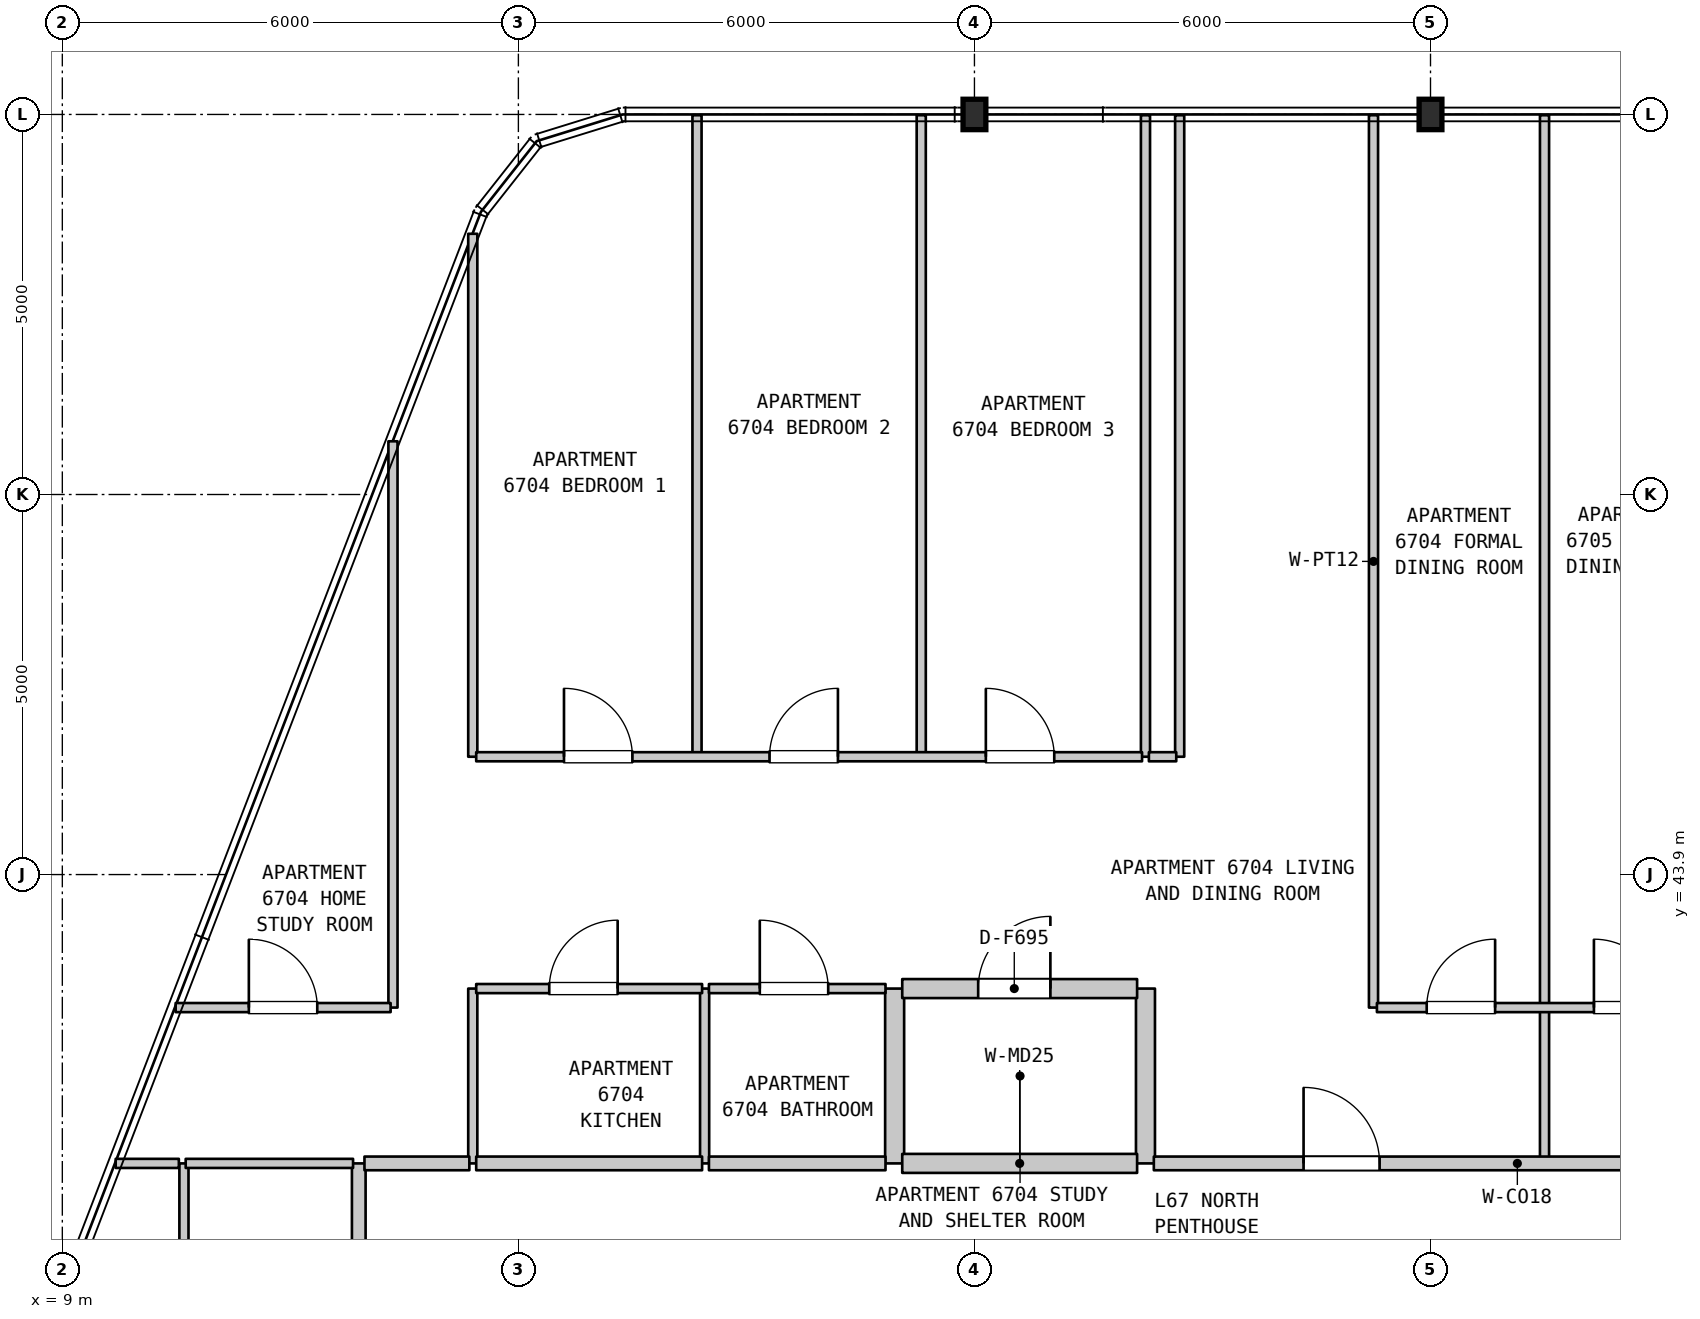
"""IFC4 building model, lengths in metres.
Left out: names, types, materials, properties, quantities, classifications, styles, units other than length and angle.
Written with IfcOpenShell. Run it as: python <this file> out.ifc"""

import sys

from ifc_helpers import new_model, si_unit, direction, frame, frame_2d, origin, origin_2d, place, context, subcontext, project, spatial, rectangle, i_section, extrude, element, fill, save


model = new_model("IFC4")
c1 = context("Model", 3, precision=1e-05, world=origin(), true_north=direction((0.0, 1.0)))
c2 = subcontext(c1, "Body", "Model", "MODEL_VIEW")
j1 = project(units=[si_unit("LENGTHUNIT", "METRE"), si_unit("PLANEANGLEUNIT", "RADIAN")], contexts=[c1])
p1 = place(None, origin())
s1 = spatial("IfcSite", under=j1, at=p1, CompositionType="ELEMENT")
p2 = place(p1, origin())
s2 = spatial("IfcBuilding", under=s1, at=p2, CompositionType="ELEMENT")
p3 = place(p2, frame((0.0, 0.0, 269.5)))
s3 = spatial("IfcBuildingStorey", under=s2, at=p3, CompositionType="ELEMENT", Elevation=269.5)
for number, where, z_axis, x_axis in (
    (1, (21.0, 53.9, 0.0), (0.0, 0.0, 1.0), (1.0, 0.0, 0.0)),
    (2, (27.0, 53.9, 0.0), (0.0, 0.0, 1.0), (1.0, 0.0, 0.0)),
):
    element("IfcColumn", number, at=place(p3, frame(where, z_axis=z_axis, x_axis=x_axis)), inside=s3, PredefinedType="COLUMN", context=c2, shape_type="SweptSolid", body=[
        extrude(i_section(OverallWidth=0.3, OverallDepth=0.4, WebThickness=0.013, FlangeThickness=0.024, FilletRadius=0.027, at=origin_2d()), origin(), (0.0, 0.0, 1.0), 3.7),
    ])
p4 = place(p3, frame((10.6, 33.32, 0.0), z_axis=(0.0, 0.0, 1.0), x_axis=(0.0, 1.0, 0.0)))
e3 = element("IfcWall", 3, at=p4, inside=s3, PredefinedType="PARTITIONING", context=c2, shape_type="SweptSolid", body=[
    extrude(rectangle(XDim=6.78, YDim=0.12, at=frame_2d((3.39, 0.0))), origin(), (0.0, 0.0, 1.0), 3.39),
])
p5 = place(p3, frame((12.9, 33.32, 0.0), z_axis=(0.0, 0.0, 1.0), x_axis=(0.0, 1.0, 0.0)))
e4 = element("IfcWall", 4, at=p5, inside=s3, PredefinedType="STANDARD", context=c2, shape_type="SweptSolid", body=[
    extrude(rectangle(XDim=6.78, YDim=0.18, at=frame_2d((3.39, 0.0))), origin(), (0.0, 0.0, 1.0), 3.39),
])
p6 = place(p3, frame((13.35, 42.15, 0.0), z_axis=(0.0, 0.0, 1.0), x_axis=(0.0, 1.0, 0.0)))
e5 = element("IfcWall", 5, at=p6, inside=s3, PredefinedType="PARTITIONING", context=c2, shape_type="SweptSolid", body=[
    extrude(rectangle(XDim=7.45, YDim=0.12, at=frame_2d((3.725, 0.0))), origin(), (0.0, 0.0, 1.0), 3.39),
])
p7 = place(p3, frame((14.4, 40.1, 0.0), z_axis=(0.0, 0.0, 1.0), x_axis=(0.0, 1.0, 0.0)))
e6 = element("IfcWall", 6, at=p7, inside=s3, PredefinedType="PARTITIONING", context=c2, shape_type="SweptSolid", body=[
    extrude(rectangle(XDim=2.3, YDim=0.12, at=frame_2d((1.15, 0.0))), origin(), (0.0, 0.0, 1.0), 3.39),
])
p8 = place(p3, frame((14.4, 45.45, 0.0), z_axis=(0.0, 0.0, 1.0), x_axis=(0.0, 1.0, 0.0)))
e7 = element("IfcWall", 7, at=p8, inside=s3, PredefinedType="PARTITIONING", context=c2, shape_type="SweptSolid", body=[
    extrude(rectangle(XDim=6.88, YDim=0.12, at=frame_2d((3.44, 0.0))), origin(), (0.0, 0.0, 1.0), 3.39),
])
p9 = place(p3, frame((17.35, 45.45, 0.0), z_axis=(0.0, 0.0, 1.0), x_axis=(0.0, 1.0, 0.0)))
e8 = element("IfcWall", 8, at=p9, inside=s3, PredefinedType="PARTITIONING", context=c2, shape_type="SweptSolid", body=[
    extrude(rectangle(XDim=8.44, YDim=0.12, at=frame_2d((4.22, 0.0))), origin(), (0.0, 0.0, 1.0), 3.39),
])
p10 = place(p3, frame((17.45, 40.1, 0.0), z_axis=(0.0, 0.0, 1.0), x_axis=(0.0, 1.0, 0.0)))
e9 = element("IfcWall", 9, at=p10, inside=s3, PredefinedType="PARTITIONING", context=c2, shape_type="SweptSolid", body=[
    extrude(rectangle(XDim=2.3, YDim=0.12, at=frame_2d((1.15, 0.0))), origin(), (0.0, 0.0, 1.0), 3.39),
])
p11 = place(p3, frame((19.95, 40.1, 0.0), z_axis=(0.0, 0.0, 1.0), x_axis=(0.0, 1.0, 0.0)))
e10 = element("IfcWall", 10, at=p11, inside=s3, PredefinedType="STANDARD", context=c2, shape_type="SweptSolid", body=[
    extrude(rectangle(XDim=2.3, YDim=0.25, at=frame_2d((1.15, 0.0))), origin(), (0.0, 0.0, 1.0), 3.39),
])
p12 = place(p3, frame((20.3, 45.45, 0.0), z_axis=(0.0, 0.0, 1.0), x_axis=(0.0, 1.0, 0.0)))
e11 = element("IfcWall", 11, at=p12, inside=s3, PredefinedType="PARTITIONING", context=c2, shape_type="SweptSolid", body=[
    extrude(rectangle(XDim=8.44, YDim=0.12, at=frame_2d((4.22, 0.0))), origin(), (0.0, 0.0, 1.0), 3.39),
])
p13 = place(p3, frame((23.25, 40.1, 0.0), z_axis=(0.0, 0.0, 1.0), x_axis=(0.0, 1.0, 0.0)))
e12 = element("IfcWall", 12, at=p13, inside=s3, PredefinedType="STANDARD", context=c2, shape_type="SweptSolid", body=[
    extrude(rectangle(XDim=2.3, YDim=0.25, at=frame_2d((1.15, 0.0))), origin(), (0.0, 0.0, 1.0), 3.39),
])
for number, where, z_axis, x_axis in (
    (13, (23.25, 45.45, 0.0), (0.0, 0.0, 1.0), (0.0, 1.0, 0.0)),
    (14, (23.7, 45.45, 0.0), (0.0, 0.0, 1.0), (0.0, 1.0, 0.0)),
):
    element("IfcWall", number, at=place(p3, frame(where, z_axis=z_axis, x_axis=x_axis)), inside=s3, PredefinedType="PARTITIONING", context=c2, shape_type="SweptSolid", body=[
        extrude(rectangle(XDim=8.44, YDim=0.12, at=frame_2d((4.22, 0.0))), origin(), (0.0, 0.0, 1.0), 3.39),
    ])
p14 = place(p3, frame((26.25, 42.15, 0.0), z_axis=(0.0, 0.0, 1.0), x_axis=(0.0, 1.0, 0.0)))
e15 = element("IfcWall", 15, at=p14, inside=s3, PredefinedType="PARTITIONING", context=c2, shape_type="SweptSolid", body=[
    extrude(rectangle(XDim=11.74, YDim=0.12, at=frame_2d((5.87, 0.0))), origin(), (0.0, 0.0, 1.0), 3.39),
])
p15 = place(p3, frame((28.5, 40.1, 0.0), z_axis=(0.0, 0.0, 1.0), x_axis=(0.0, 1.0, 0.0)))
e16 = element("IfcWall", 16, at=p15, inside=s3, PredefinedType="PARTITIONING", context=c2, shape_type="SweptSolid", body=[
    extrude(rectangle(XDim=2.05, YDim=0.12, at=frame_2d((1.025, 0.0))), origin(), (0.0, 0.0, 1.0), 3.39),
])
p16 = place(p3, frame((28.5, 42.15, 0.0), z_axis=(0.0, 0.0, 1.0), x_axis=(0.0, 1.0, 0.0)))
e17 = element("IfcWall", 17, at=p16, inside=s3, PredefinedType="PARTITIONING", context=c2, shape_type="SweptSolid", body=[
    extrude(rectangle(XDim=11.74, YDim=0.12, at=frame_2d((5.87, 0.0))), origin(), (0.0, 0.0, 1.0), 3.39),
])
p17 = place(p3, frame((9.702, 40.1, 0.0), z_axis=(0.0, 0.0, 1.0), x_axis=(1.0, 0.0, 0.0)))
e18 = element("IfcWall", 18, at=p17, inside=s3, PredefinedType="PARTITIONING", context=c2, shape_type="SweptSolid", body=[
    extrude(rectangle(XDim=0.831, YDim=0.12, at=frame_2d((0.416, 0.0))), origin(), (0.0, 0.0, 1.0), 3.39),
])
p18 = place(p3, frame((10.623, 40.1, 0.0), z_axis=(0.0, 0.0, 1.0), x_axis=(1.0, 0.0, 0.0)))
e19 = element("IfcWall", 19, at=p18, inside=s3, PredefinedType="PARTITIONING", context=c2, shape_type="SweptSolid", body=[
    extrude(rectangle(XDim=2.202, YDim=0.12, at=frame_2d((1.101, 0.0))), origin(), (0.0, 0.0, 1.0), 3.39),
])
p19 = place(p3, frame((12.975, 40.1, 0.0), z_axis=(0.0, 0.0, 1.0), x_axis=(1.0, 0.0, 0.0)))
e20 = element("IfcWall", 20, at=p19, inside=s3, PredefinedType="STANDARD", context=c2, shape_type="SweptSolid", body=[
    extrude(rectangle(XDim=1.38, YDim=0.18, at=frame_2d((0.69, 0.0))), origin(), (0.0, 0.0, 1.0), 3.39),
])
p20 = place(p3, frame((14.445, 40.1, 0.0), z_axis=(0.0, 0.0, 1.0), x_axis=(1.0, 0.0, 0.0)))
e21 = element("IfcWall", 21, at=p20, inside=s3, PredefinedType="STANDARD", context=c2, shape_type="SweptSolid", body=[
    extrude(rectangle(XDim=2.972, YDim=0.18, at=frame_2d((1.486, 0.0))), origin(), (0.0, 0.0, 1.0), 3.39),
])
p21 = place(p3, frame((17.507, 40.1, 0.0), z_axis=(0.0, 0.0, 1.0), x_axis=(1.0, 0.0, 0.0)))
e22 = element("IfcWall", 22, at=p21, inside=s3, PredefinedType="STANDARD", context=c2, shape_type="SweptSolid", body=[
    extrude(rectangle(XDim=2.323, YDim=0.18, at=frame_2d((1.162, 0.0))), origin(), (0.0, 0.0, 1.0), 3.39),
])
p22 = place(p3, frame((20.05, 40.1, 0.0), z_axis=(0.0, 0.0, 1.0), x_axis=(1.0, 0.0, 0.0)))
e23 = element("IfcWall", 23, at=p22, inside=s3, PredefinedType="STANDARD", context=c2, shape_type="SweptSolid", body=[
    extrude(rectangle(XDim=3.09, YDim=0.25, at=frame_2d((1.545, 0.0))), origin(), (0.0, 0.0, 1.0), 3.39),
])
p23 = place(p3, frame((23.36, 40.1, 0.0), z_axis=(0.0, 0.0, 1.0), x_axis=(1.0, 0.0, 0.0)))
e24 = element("IfcWall", 24, at=p23, inside=s3, PredefinedType="STANDARD", context=c2, shape_type="SweptSolid", body=[
    extrude(rectangle(XDim=9.565, YDim=0.18, at=frame_2d((4.782, 0.0))), origin(), (0.0, 0.0, 1.0), 3.39),
])
p24 = place(p23, frame((1.97, 0.0, 0.0)))
e25 = element("IfcOpeningElement", 25, at=p24, cuts=e24, PredefinedType="OPENING", context=c2, shape_type="SweptSolid", body=[
    extrude(rectangle(XDim=1.0, YDim=2.15, at=frame_2d((0.5, 1.075))), frame((0.0, 0.1, 0.0), z_axis=(0.0, -1.0, 0.0), x_axis=(1.0, 0.0, 0.0)), (0.0, 0.0, 1.0), 0.2),
])
p25 = place(p23, frame((6.793, 0.0, 0.0)))
e26 = element("IfcOpeningElement", 26, at=p25, cuts=e24, PredefinedType="OPENING", context=c2, shape_type="SweptSolid", body=[
    extrude(rectangle(XDim=1.0, YDim=2.15, at=frame_2d((0.5, 1.075))), frame((0.0, 0.1, 0.0), z_axis=(0.0, -1.0, 0.0), x_axis=(1.0, 0.0, 0.0)), (0.0, 0.0, 1.0), 0.2),
])
p26 = place(p3, frame((10.491, 42.15, 0.0), z_axis=(0.0, 0.0, 1.0), x_axis=(1.0, 0.0, 0.0)))
e27 = element("IfcWall", 27, at=p26, inside=s3, PredefinedType="PARTITIONING", context=c2, shape_type="SweptSolid", body=[
    extrude(rectangle(XDim=2.828, YDim=0.12, at=frame_2d((1.414, 0.0))), origin(), (0.0, 0.0, 1.0), 3.39),
])
p27 = place(p26, frame((0.963, 0.0, 0.0)))
e28 = element("IfcOpeningElement", 28, at=p27, cuts=e27, PredefinedType="OPENING", context=c2, shape_type="SweptSolid", body=[
    extrude(rectangle(XDim=0.9, YDim=2.15, at=frame_2d((0.45, 1.075))), frame((0.0, 0.07, 0.0), z_axis=(0.0, -1.0, 0.0), x_axis=(1.0, 0.0, 0.0)), (0.0, 0.0, 1.0), 0.14),
])
p28 = place(p3, frame((26.295, 42.15, 0.0), z_axis=(0.0, 0.0, 1.0), x_axis=(1.0, 0.0, 0.0)))
e29 = element("IfcWall", 29, at=p28, inside=s3, PredefinedType="PARTITIONING", context=c2, shape_type="SweptSolid", body=[
    extrude(rectangle(XDim=4.41, YDim=0.12, at=frame_2d((2.205, 0.0))), origin(), (0.0, 0.0, 1.0), 3.39),
])
p29 = place(p28, frame((0.655, 0.0, 0.0)))
e30 = element("IfcOpeningElement", 30, at=p29, cuts=e29, PredefinedType="OPENING", context=c2, shape_type="SweptSolid", body=[
    extrude(rectangle(XDim=0.9, YDim=2.15, at=frame_2d((0.45, 1.075))), frame((0.0, 0.07, 0.0), z_axis=(0.0, -1.0, 0.0), x_axis=(1.0, 0.0, 0.0)), (0.0, 0.0, 1.0), 0.14),
])
p30 = place(p28, frame((2.855, 0.0, 0.0)))
e31 = element("IfcOpeningElement", 31, at=p30, cuts=e29, PredefinedType="OPENING", context=c2, shape_type="SweptSolid", body=[
    extrude(rectangle(XDim=0.9, YDim=2.15, at=frame_2d((0.45, 1.075))), frame((0.0, 0.07, 0.0), z_axis=(0.0, -1.0, 0.0), x_axis=(1.0, 0.0, 0.0)), (0.0, 0.0, 1.0), 0.14),
])
p31 = place(p3, frame((14.445, 42.4, 0.0), z_axis=(0.0, 0.0, 1.0), x_axis=(1.0, 0.0, 0.0)))
e32 = element("IfcWall", 32, at=p31, inside=s3, PredefinedType="PARTITIONING", context=c2, shape_type="SweptSolid", body=[
    extrude(rectangle(XDim=2.972, YDim=0.12, at=frame_2d((1.486, 0.0))), origin(), (0.0, 0.0, 1.0), 3.39),
])
p32 = place(p31, frame((0.961, 0.0, 0.0)))
e33 = element("IfcOpeningElement", 33, at=p32, cuts=e32, PredefinedType="OPENING", context=c2, shape_type="SweptSolid", body=[
    extrude(rectangle(XDim=0.9, YDim=2.15, at=frame_2d((0.45, 1.075))), frame((0.0, 0.07, 0.0), z_axis=(0.0, -1.0, 0.0), x_axis=(1.0, 0.0, 0.0)), (0.0, 0.0, 1.0), 0.14),
])
p33 = place(p3, frame((17.507, 42.4, 0.0), z_axis=(0.0, 0.0, 1.0), x_axis=(1.0, 0.0, 0.0)))
e34 = element("IfcWall", 34, at=p33, inside=s3, PredefinedType="PARTITIONING", context=c2, shape_type="SweptSolid", body=[
    extrude(rectangle(XDim=2.323, YDim=0.12, at=frame_2d((1.162, 0.0))), origin(), (0.0, 0.0, 1.0), 3.39),
])
p34 = place(p33, frame((0.669, 0.0, 0.0)))
e35 = element("IfcOpeningElement", 35, at=p34, cuts=e34, PredefinedType="OPENING", context=c2, shape_type="SweptSolid", body=[
    extrude(rectangle(XDim=0.9, YDim=2.1, at=frame_2d((0.45, 1.05))), frame((0.0, 0.07, 0.0), z_axis=(0.0, -1.0, 0.0), x_axis=(1.0, 0.0, 0.0)), (0.0, 0.0, 1.0), 0.14),
])
p35 = place(p3, frame((20.05, 42.4, 0.0), z_axis=(0.0, 0.0, 1.0), x_axis=(1.0, 0.0, 0.0)))
e36 = element("IfcWall", 36, at=p35, inside=s3, PredefinedType="STANDARD", context=c2, shape_type="SweptSolid", body=[
    extrude(rectangle(XDim=3.09, YDim=0.25, at=frame_2d((1.545, 0.0))), origin(), (0.0, 0.0, 1.0), 3.39),
])
p36 = place(p35, frame((0.999, 0.0, 0.0)))
e37 = element("IfcOpeningElement", 37, at=p36, cuts=e36, PredefinedType="OPENING", context=c2, shape_type="SweptSolid", body=[
    extrude(rectangle(XDim=0.95, YDim=2.15, at=frame_2d((0.475, 1.075))), frame((0.0, 0.135, 0.0), z_axis=(0.0, -1.0, 0.0), x_axis=(1.0, 0.0, 0.0)), (0.0, 0.0, 1.0), 0.27),
])
p37 = place(p3, frame((14.445, 45.45, 0.0), z_axis=(0.0, 0.0, 1.0), x_axis=(1.0, 0.0, 0.0)))
e38 = element("IfcWall", 38, at=p37, inside=s3, PredefinedType="PARTITIONING", context=c2, shape_type="SweptSolid", body=[
    extrude(rectangle(XDim=8.76, YDim=0.12, at=frame_2d((4.38, 0.0))), origin(), (0.0, 0.0, 1.0), 3.39),
])
p38 = place(p37, frame((1.155, 0.0, 0.0)))
e39 = element("IfcOpeningElement", 39, at=p38, cuts=e38, PredefinedType="OPENING", context=c2, shape_type="SweptSolid", body=[
    extrude(rectangle(XDim=0.9, YDim=2.15, at=frame_2d((0.45, 1.075))), frame((0.0, 0.07, 0.0), z_axis=(0.0, -1.0, 0.0), x_axis=(1.0, 0.0, 0.0)), (0.0, 0.0, 1.0), 0.14),
])
p39 = place(p37, frame((3.859, 0.0, 0.0)))
e40 = element("IfcOpeningElement", 40, at=p39, cuts=e38, PredefinedType="OPENING", context=c2, shape_type="SweptSolid", body=[
    extrude(rectangle(XDim=0.9, YDim=2.15, at=frame_2d((0.45, 1.075))), frame((0.0, 0.07, 0.0), z_axis=(0.0, -1.0, 0.0), x_axis=(1.0, 0.0, 0.0)), (0.0, 0.0, 1.0), 0.14),
])
p40 = place(p37, frame((6.705, 0.0, 0.0)))
e41 = element("IfcOpeningElement", 41, at=p40, cuts=e38, PredefinedType="OPENING", context=c2, shape_type="SweptSolid", body=[
    extrude(rectangle(XDim=0.9, YDim=2.15, at=frame_2d((0.45, 1.075))), frame((0.0, 0.07, 0.0), z_axis=(0.0, -1.0, 0.0), x_axis=(1.0, 0.0, 0.0)), (0.0, 0.0, 1.0), 0.14),
])
p41 = place(p3, frame((23.295, 45.45, 0.0), z_axis=(0.0, 0.0, 1.0), x_axis=(1.0, 0.0, 0.0)))
e42 = element("IfcWall", 42, at=p41, inside=s3, PredefinedType="PARTITIONING", context=c2, shape_type="SweptSolid", body=[
    extrude(rectangle(XDim=0.36, YDim=0.12, at=frame_2d((0.18, 0.0))), origin(), (0.0, 0.0, 1.0), 3.39),
])
p42 = place(p24, origin())
e43 = element("IfcDoor", 43, at=p42, inside=s3, OperationType="SINGLE_SWING_LEFT", PredefinedType="DOOR", context=c2, shape_type="SweptSolid", body=[
    extrude(rectangle(XDim=1.0, YDim=2.15, at=frame_2d((0.5, 1.075))), frame((0.0, 0.025, 0.0), z_axis=(0.0, -1.0, 0.0), x_axis=(1.0, 0.0, 0.0)), (0.0, 0.0, 1.0), 0.05),
])
fill(e25, e43)
p43 = place(p27, origin())
e44 = element("IfcDoor", 44, at=p43, inside=s3, OperationType="SINGLE_SWING_LEFT", PredefinedType="DOOR", context=c2, shape_type="SweptSolid", body=[
    extrude(rectangle(XDim=0.9, YDim=2.15, at=frame_2d((0.45, 1.075))), frame((0.0, 0.025, 0.0), z_axis=(0.0, -1.0, 0.0), x_axis=(1.0, 0.0, 0.0)), (0.0, 0.0, 1.0), 0.05),
])
fill(e28, e44)
p44 = place(p29, origin())
e45 = element("IfcDoor", 45, at=p44, inside=s3, OperationType="SINGLE_SWING_RIGHT", PredefinedType="DOOR", context=c2, shape_type="SweptSolid", body=[
    extrude(rectangle(XDim=0.9, YDim=2.15, at=frame_2d((0.45, 1.075))), frame((0.0, 0.025, 0.0), z_axis=(0.0, -1.0, 0.0), x_axis=(1.0, 0.0, 0.0)), (0.0, 0.0, 1.0), 0.05),
])
fill(e30, e45)
p45 = place(p30, origin())
e46 = element("IfcDoor", 46, at=p45, inside=s3, OperationType="SINGLE_SWING_LEFT", PredefinedType="DOOR", context=c2, shape_type="SweptSolid", body=[
    extrude(rectangle(XDim=0.9, YDim=2.15, at=frame_2d((0.45, 1.075))), frame((0.0, 0.025, 0.0), z_axis=(0.0, -1.0, 0.0), x_axis=(1.0, 0.0, 0.0)), (0.0, 0.0, 1.0), 0.05),
])
fill(e31, e46)
p46 = place(p32, origin())
e47 = element("IfcDoor", 47, at=p46, inside=s3, OperationType="SINGLE_SWING_RIGHT", PredefinedType="DOOR", context=c2, shape_type="SweptSolid", body=[
    extrude(rectangle(XDim=0.9, YDim=2.15, at=frame_2d((0.45, 1.075))), frame((0.0, 0.025, 0.0), z_axis=(0.0, -1.0, 0.0), x_axis=(1.0, 0.0, 0.0)), (0.0, 0.0, 1.0), 0.05),
])
fill(e33, e47)
p47 = place(p34, origin())
e48 = element("IfcDoor", 48, at=p47, inside=s3, OperationType="SINGLE_SWING_LEFT", PredefinedType="DOOR", context=c2, shape_type="SweptSolid", body=[
    extrude(rectangle(XDim=0.9, YDim=2.1, at=frame_2d((0.45, 1.05))), frame((0.0, 0.025, 0.0), z_axis=(0.0, -1.0, 0.0), x_axis=(1.0, 0.0, 0.0)), (0.0, 0.0, 1.0), 0.05),
])
fill(e35, e48)
p48 = place(p36, origin())
e49 = element("IfcDoor", 49, at=p48, inside=s3, OperationType="SINGLE_SWING_RIGHT", PredefinedType="DOOR", context=c2, shape_type="SweptSolid", body=[
    extrude(rectangle(XDim=0.95, YDim=2.15, at=frame_2d((0.475, 1.075))), frame((0.0, 0.025, 0.0), z_axis=(0.0, -1.0, 0.0), x_axis=(1.0, 0.0, 0.0)), (0.0, 0.0, 1.0), 0.05),
])
fill(e37, e49)
p49 = place(p38, origin())
e50 = element("IfcDoor", 50, at=p49, inside=s3, OperationType="SINGLE_SWING_LEFT", PredefinedType="DOOR", context=c2, shape_type="SweptSolid", body=[
    extrude(rectangle(XDim=0.9, YDim=2.15, at=frame_2d((0.45, 1.075))), frame((0.0, 0.025, 0.0), z_axis=(0.0, -1.0, 0.0), x_axis=(1.0, 0.0, 0.0)), (0.0, 0.0, 1.0), 0.05),
])
fill(e39, e50)
p50 = place(p39, origin())
e51 = element("IfcDoor", 51, at=p50, inside=s3, OperationType="SINGLE_SWING_RIGHT", PredefinedType="DOOR", context=c2, shape_type="SweptSolid", body=[
    extrude(rectangle(XDim=0.9, YDim=2.15, at=frame_2d((0.45, 1.075))), frame((0.0, 0.025, 0.0), z_axis=(0.0, -1.0, 0.0), x_axis=(1.0, 0.0, 0.0)), (0.0, 0.0, 1.0), 0.05),
])
fill(e40, e51)
p51 = place(p40, origin())
e52 = element("IfcDoor", 52, at=p51, inside=s3, OperationType="SINGLE_SWING_LEFT", PredefinedType="DOOR", context=c2, shape_type="SweptSolid", body=[
    extrude(rectangle(XDim=0.9, YDim=2.15, at=frame_2d((0.45, 1.075))), frame((0.0, 0.025, 0.0), z_axis=(0.0, -1.0, 0.0), x_axis=(1.0, 0.0, 0.0)), (0.0, 0.0, 1.0), 0.05),
])
fill(e41, e52)
save(model, sys.argv[1])
